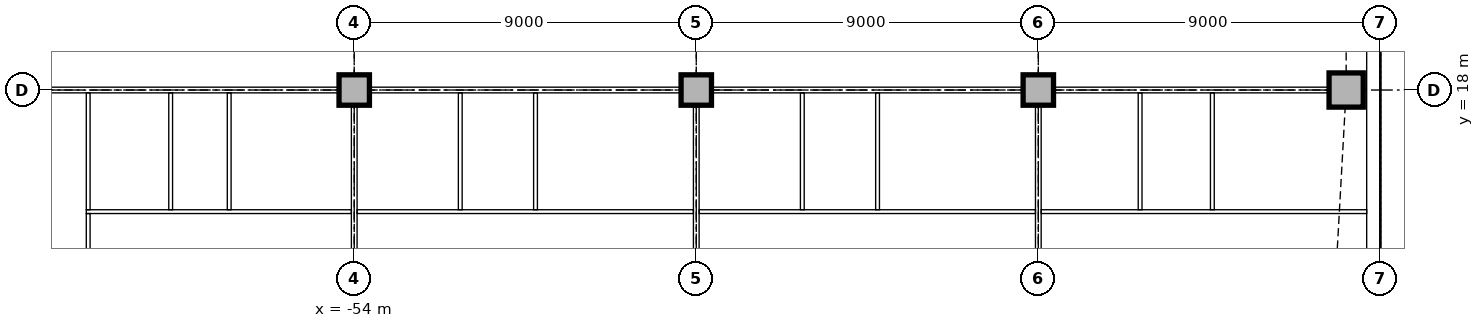
"""IFC4 building model, lengths in metres.
Left out: names, types, materials, properties, quantities, classifications, styles, units other than length and angle.
Written with IfcOpenShell. Run it as: python <this file> out.ifc"""

import sys

from ifc_helpers import new_model, si_unit, direction, frame, frame_2d, origin, origin_2d, place, context, subcontext, project, spatial, rectangle, extrude, element, fill, save


model = new_model("IFC4")
c1 = context("Model", 3, precision=1e-05, world=origin(), true_north=direction((0.0, 1.0)))
c2 = subcontext(c1, "Body", "Model", "MODEL_VIEW")
j1 = project(units=[si_unit("LENGTHUNIT", "METRE"), si_unit("PLANEANGLEUNIT", "RADIAN")], contexts=[c1])
p1 = place(None, origin())
s1 = spatial("IfcSite", under=j1, at=p1, CompositionType="ELEMENT")
p2 = place(p1, origin())
s2 = spatial("IfcBuilding", under=s1, at=p2, CompositionType="ELEMENT")
p3 = place(p2, frame((0.0, 0.0, 26.0)))
s3 = spatial("IfcBuildingStorey", under=s2, at=p3, CompositionType="ELEMENT", Elevation=26.0)
p4 = place(p3, frame((-27.9, 18.0, 0.0), z_axis=(0.0, 0.0, 1.0), x_axis=(1.0, 0.0, 0.0)))
e1 = element("IfcColumn", 1, at=p4, inside=s3, PredefinedType="COLUMN", context=c2, shape_type="SweptSolid", body=[
    extrude(rectangle(XDim=0.9, YDim=0.9, at=origin_2d()), origin(), (0.0, 0.0, 1.0), 3.85),
])
for number, where, z_axis, x_axis in (
    (2, (-54.0, 18.0, 0.0), (0.0, 0.0, 1.0), (1.0, 0.0, 0.0)),
    (3, (-45.0, 18.0, 0.0), (0.0, 0.0, 1.0), (1.0, 0.0, 0.0)),
    (4, (-36.0, 18.0, 0.0), (0.0, 0.0, 1.0), (1.0, 0.0, 0.0)),
):
    element("IfcColumn", number, at=place(p3, frame(where, z_axis=z_axis, x_axis=x_axis)), inside=s3, PredefinedType="COLUMN", context=c2, shape_type="SweptSolid", body=[
        extrude(rectangle(XDim=0.8, YDim=0.8, at=origin_2d()), origin(), (0.0, 0.0, 1.0), 3.85),
    ])
p5 = place(p3, frame((-27.18, 8.743, 0.0), z_axis=(0.0, 0.0, 1.0), x_axis=(0.0, 1.0, 0.0)))
e5 = element("IfcWall", 5, at=p5, inside=s3, PredefinedType="STANDARD", context=c2, shape_type="SweptSolid", body=[
    extrude(rectangle(XDim=12.257, YDim=0.36, at=frame_2d((6.129, 0.0))), origin(), (0.0, 0.0, 1.0), 3.85),
])
p6 = place(p5, frame((2.607, 0.0, 0.9)))
e6 = element("IfcOpeningElement", 6, at=p6, cuts=e5, PredefinedType="OPENING", context=c2, shape_type="SweptSolid", body=[
    extrude(rectangle(XDim=3.3, YDim=1.6, at=frame_2d((1.65, 0.8))), frame((0.0, 0.19, 0.0), z_axis=(0.0, -1.0, 0.0), x_axis=(1.0, 0.0, 0.0)), (0.0, 0.0, 1.0), 0.38),
])
p7 = place(p5, frame((7.607, 0.0, 0.9)))
e7 = element("IfcOpeningElement", 7, at=p7, cuts=e5, PredefinedType="OPENING", context=c2, shape_type="SweptSolid", body=[
    extrude(rectangle(XDim=3.3, YDim=1.6, at=frame_2d((1.65, 0.8))), frame((0.0, 0.19, 0.0), z_axis=(0.0, -1.0, 0.0), x_axis=(1.0, 0.0, 0.0)), (0.0, 0.0, 1.0), 0.38),
])
p8 = place(p3, frame((-35.6, 18.0, 0.0), z_axis=(0.0, 0.0, 1.0), x_axis=(1.0, 0.0, 0.0)))
e8 = element("IfcWall", 8, at=p8, inside=s3, PredefinedType="PARTITIONING", context=c2, shape_type="SweptSolid", body=[
    extrude(rectangle(XDim=7.25, YDim=0.15, at=frame_2d((3.625, 0.0))), origin(), (0.0, 0.0, 1.0), 3.15),
])
p9 = place(p8, frame((2.728, 0.0, 0.0)))
e9 = element("IfcOpeningElement", 9, at=p9, cuts=e8, PredefinedType="OPENING", context=c2, shape_type="SweptSolid", body=[
    extrude(rectangle(XDim=1.0, YDim=2.1, at=frame_2d((0.5, 1.05))), frame((0.0, 0.085, 0.0), z_axis=(0.0, -1.0, 0.0), x_axis=(1.0, 0.0, 0.0)), (0.0, 0.0, 1.0), 0.17),
])
p10 = place(p3, frame((-44.6, 18.0, 0.0), z_axis=(0.0, 0.0, 1.0), x_axis=(1.0, 0.0, 0.0)))
e10 = element("IfcWall", 10, at=p10, inside=s3, PredefinedType="PARTITIONING", context=c2, shape_type="SweptSolid", body=[
    extrude(rectangle(XDim=8.2, YDim=0.15, at=frame_2d((4.1, 0.0))), origin(), (0.0, 0.0, 1.0), 3.15),
])
p11 = place(p10, frame((3.0, 0.0, 0.0)))
e11 = element("IfcOpeningElement", 11, at=p11, cuts=e10, PredefinedType="OPENING", context=c2, shape_type="SweptSolid", body=[
    extrude(rectangle(XDim=1.0, YDim=2.1, at=frame_2d((0.5, 1.05))), frame((0.0, 0.085, 0.0), z_axis=(0.0, -1.0, 0.0), x_axis=(1.0, 0.0, 0.0)), (0.0, 0.0, 1.0), 0.17),
])
p12 = place(p3, frame((-53.6, 18.0, 0.0), z_axis=(0.0, 0.0, 1.0), x_axis=(1.0, 0.0, 0.0)))
e12 = element("IfcWall", 12, at=p12, inside=s3, PredefinedType="PARTITIONING", context=c2, shape_type="SweptSolid", body=[
    extrude(rectangle(XDim=8.2, YDim=0.15, at=frame_2d((4.1, 0.0))), origin(), (0.0, 0.0, 1.0), 3.15),
])
p13 = place(p12, frame((2.89, 0.0, 0.0)))
e13 = element("IfcOpeningElement", 13, at=p13, cuts=e12, PredefinedType="OPENING", context=c2, shape_type="SweptSolid", body=[
    extrude(rectangle(XDim=1.0, YDim=2.1, at=frame_2d((0.5, 1.05))), frame((0.0, 0.085, 0.0), z_axis=(0.0, -1.0, 0.0), x_axis=(1.0, 0.0, 0.0)), (0.0, 0.0, 1.0), 0.17),
])
p14 = place(p3, frame((-62.6, 18.0, 0.0), z_axis=(0.0, 0.0, 1.0), x_axis=(1.0, 0.0, 0.0)))
e14 = element("IfcWall", 14, at=p14, inside=s3, PredefinedType="PARTITIONING", context=c2, shape_type="SweptSolid", body=[
    extrude(rectangle(XDim=8.2, YDim=0.15, at=frame_2d((4.1, 0.0))), origin(), (0.0, 0.0, 1.0), 3.15),
])
p15 = place(p14, frame((0.4, 0.0, 0.0)))
e15 = element("IfcOpeningElement", 15, at=p15, cuts=e14, PredefinedType="OPENING", context=c2, shape_type="SweptSolid", body=[
    extrude(rectangle(XDim=0.9, YDim=2.1, at=frame_2d((0.45, 1.05))), frame((0.0, 0.085, 0.0), z_axis=(0.0, -1.0, 0.0), x_axis=(1.0, 0.0, 0.0)), (0.0, 0.0, 1.0), 0.17),
])
p16 = place(p14, frame((4.02, 0.0, 0.0)))
e16 = element("IfcOpeningElement", 16, at=p16, cuts=e14, PredefinedType="OPENING", context=c2, shape_type="SweptSolid", body=[
    extrude(rectangle(XDim=1.0, YDim=2.1, at=frame_2d((0.5, 1.05))), frame((0.0, 0.085, 0.0), z_axis=(0.0, -1.0, 0.0), x_axis=(1.0, 0.0, 0.0)), (0.0, 0.0, 1.0), 0.17),
])
for number, where, z_axis, x_axis in (
    (17, (-54.0, 9.4, 0.0), (0.0, 0.0, 1.0), (0.0, 1.0, 0.0)),
    (18, (-45.0, 9.4, 0.0), (0.0, 0.0, 1.0), (0.0, 1.0, 0.0)),
    (19, (-36.0, 9.4, 0.0), (0.0, 0.0, 1.0), (0.0, 1.0, 0.0)),
):
    element("IfcWall", number, at=place(p3, frame(where, z_axis=z_axis, x_axis=x_axis)), inside=s3, PredefinedType="PARTITIONING", context=c2, shape_type="SweptSolid", body=[
        extrude(rectangle(XDim=8.2, YDim=0.15, at=frame_2d((4.1, 0.0))), origin(), (0.0, 0.0, 1.0), 3.158),
    ])
p17 = place(p3, frame((-61.05, 14.8, 0.0), z_axis=(0.0, 0.0, 1.0), x_axis=(1.0, 0.0, 0.0)))
e20 = element("IfcWall", 20, at=p17, inside=s3, PredefinedType="PARTITIONING", context=c2, shape_type="SweptSolid", body=[
    extrude(rectangle(XDim=6.975, YDim=0.1, at=frame_2d((3.487, 0.0))), origin(), (0.0, 0.0, 1.0), 3.85),
])
p18 = place(p17, frame((2.52, 0.0, 0.0)))
e21 = element("IfcOpeningElement", 21, at=p18, cuts=e20, PredefinedType="OPENING", context=c2, shape_type="SweptSolid", body=[
    extrude(rectangle(XDim=0.9, YDim=2.1, at=frame_2d((0.45, 1.05))), frame((0.0, 0.06, 0.0), z_axis=(0.0, -1.0, 0.0), x_axis=(1.0, 0.0, 0.0)), (0.0, 0.0, 1.0), 0.12),
])
p19 = place(p3, frame((-53.925, 14.8, 0.0), z_axis=(0.0, 0.0, 1.0), x_axis=(1.0, 0.0, 0.0)))
e22 = element("IfcWall", 22, at=p19, inside=s3, PredefinedType="PARTITIONING", context=c2, shape_type="SweptSolid", body=[
    extrude(rectangle(XDim=8.85, YDim=0.1, at=frame_2d((4.425, 0.0))), origin(), (0.0, 0.0, 1.0), 3.85),
])
p20 = place(p19, frame((3.265, 0.0, 0.0)))
e23 = element("IfcOpeningElement", 23, at=p20, cuts=e22, PredefinedType="OPENING", context=c2, shape_type="SweptSolid", body=[
    extrude(rectangle(XDim=0.9, YDim=2.1, at=frame_2d((0.45, 1.05))), frame((0.0, 0.06, 0.0), z_axis=(0.0, -1.0, 0.0), x_axis=(1.0, 0.0, 0.0)), (0.0, 0.0, 1.0), 0.12),
])
p21 = place(p3, frame((-44.925, 14.8, 0.0), z_axis=(0.0, 0.0, 1.0), x_axis=(1.0, 0.0, 0.0)))
e24 = element("IfcWall", 24, at=p21, inside=s3, PredefinedType="PARTITIONING", context=c2, shape_type="SweptSolid", body=[
    extrude(rectangle(XDim=8.85, YDim=0.1, at=frame_2d((4.425, 0.0))), origin(), (0.0, 0.0, 1.0), 3.85),
])
p22 = place(p21, frame((3.265, 0.0, 0.0)))
e25 = element("IfcOpeningElement", 25, at=p22, cuts=e24, PredefinedType="OPENING", context=c2, shape_type="SweptSolid", body=[
    extrude(rectangle(XDim=0.9, YDim=2.1, at=frame_2d((0.45, 1.05))), frame((0.0, 0.06, 0.0), z_axis=(0.0, -1.0, 0.0), x_axis=(1.0, 0.0, 0.0)), (0.0, 0.0, 1.0), 0.12),
])
p23 = place(p3, frame((-35.925, 14.8, 0.0), z_axis=(0.0, 0.0, 1.0), x_axis=(1.0, 0.0, 0.0)))
e26 = element("IfcWall", 26, at=p23, inside=s3, PredefinedType="PARTITIONING", context=c2, shape_type="SweptSolid", body=[
    extrude(rectangle(XDim=8.565, YDim=0.1, at=frame_2d((4.282, 0.0))), origin(), (0.0, 0.0, 1.0), 3.85),
])
p24 = place(p23, frame((3.103, 0.0, 0.0)))
e27 = element("IfcOpeningElement", 27, at=p24, cuts=e26, PredefinedType="OPENING", context=c2, shape_type="SweptSolid", body=[
    extrude(rectangle(XDim=0.9, YDim=2.1, at=frame_2d((0.45, 1.05))), frame((0.0, 0.06, 0.0), z_axis=(0.0, -1.0, 0.0), x_axis=(1.0, 0.0, 0.0)), (0.0, 0.0, 1.0), 0.12),
])
p25 = place(p3, frame((-61.0, 14.85, 0.0), z_axis=(0.0, 0.0, 1.0), x_axis=(0.0, 1.0, 0.0)))
e28 = element("IfcWall", 28, at=p25, inside=s3, PredefinedType="PARTITIONING", context=c2, shape_type="SweptSolid", body=[
    extrude(rectangle(XDim=3.075, YDim=0.1, at=frame_2d((1.538, 0.0))), origin(), (0.0, 0.0, 1.0), 3.85),
])
p26 = place(p3, frame((-61.0, 4.86, 0.0), z_axis=(0.0, 0.0, 1.0), x_axis=(0.0, 1.0, 0.0)))
e29 = element("IfcWall", 29, at=p26, inside=s3, PredefinedType="PARTITIONING", context=c2, shape_type="SweptSolid", body=[
    extrude(rectangle(XDim=9.89, YDim=0.1, at=frame_2d((4.945, 0.0))), origin(), (0.0, 0.0, 1.0), 3.85),
])
p27 = place(p3, frame((-58.83, 14.85, 0.0), z_axis=(0.0, 0.0, 1.0), x_axis=(0.0, 1.0, 0.0)))
e30 = element("IfcWall", 30, at=p27, inside=s3, PredefinedType="PARTITIONING", context=c2, shape_type="SweptSolid", body=[
    extrude(rectangle(XDim=3.075, YDim=0.1, at=frame_2d((1.538, 0.0))), origin(), (0.0, 0.0, 1.0), 3.85),
])
p28 = place(p27, frame((1.1, 0.0, 0.0)))
e31 = element("IfcOpeningElement", 31, at=p28, cuts=e30, PredefinedType="OPENING", context=c2, shape_type="SweptSolid", body=[
    extrude(rectangle(XDim=0.9, YDim=2.1, at=frame_2d((0.45, 1.05))), frame((0.0, 0.06, 0.0), z_axis=(0.0, -1.0, 0.0), x_axis=(1.0, 0.0, 0.0)), (0.0, 0.0, 1.0), 0.12),
])
p29 = place(p3, frame((-57.29, 14.85, 0.0), z_axis=(0.0, 0.0, 1.0), x_axis=(0.0, 1.0, 0.0)))
e32 = element("IfcWall", 32, at=p29, inside=s3, PredefinedType="PARTITIONING", context=c2, shape_type="SweptSolid", body=[
    extrude(rectangle(XDim=3.075, YDim=0.1, at=frame_2d((1.538, 0.0))), origin(), (0.0, 0.0, 1.0), 3.85),
])
p30 = place(p29, frame((1.1, 0.0, 0.0)))
e33 = element("IfcOpeningElement", 33, at=p30, cuts=e32, PredefinedType="OPENING", context=c2, shape_type="SweptSolid", body=[
    extrude(rectangle(XDim=0.9, YDim=2.1, at=frame_2d((0.45, 1.05))), frame((0.0, 0.06, 0.0), z_axis=(0.0, -1.0, 0.0), x_axis=(1.0, 0.0, 0.0)), (0.0, 0.0, 1.0), 0.12),
])
p31 = place(p3, frame((-51.21, 14.85, 0.0), z_axis=(0.0, 0.0, 1.0), x_axis=(0.0, 1.0, 0.0)))
e34 = element("IfcWall", 34, at=p31, inside=s3, PredefinedType="PARTITIONING", context=c2, shape_type="SweptSolid", body=[
    extrude(rectangle(XDim=3.075, YDim=0.1, at=frame_2d((1.538, 0.0))), origin(), (0.0, 0.0, 1.0), 3.85),
])
p32 = place(p31, frame((1.1, 0.0, 0.0)))
e35 = element("IfcOpeningElement", 35, at=p32, cuts=e34, PredefinedType="OPENING", context=c2, shape_type="SweptSolid", body=[
    extrude(rectangle(XDim=0.9, YDim=2.1, at=frame_2d((0.45, 1.05))), frame((0.0, 0.06, 0.0), z_axis=(0.0, -1.0, 0.0), x_axis=(1.0, 0.0, 0.0)), (0.0, 0.0, 1.0), 0.12),
])
p33 = place(p3, frame((-49.23, 14.85, 0.0), z_axis=(0.0, 0.0, 1.0), x_axis=(0.0, 1.0, 0.0)))
e36 = element("IfcWall", 36, at=p33, inside=s3, PredefinedType="PARTITIONING", context=c2, shape_type="SweptSolid", body=[
    extrude(rectangle(XDim=3.075, YDim=0.1, at=frame_2d((1.538, 0.0))), origin(), (0.0, 0.0, 1.0), 3.85),
])
p34 = place(p33, frame((1.1, 0.0, 0.0)))
e37 = element("IfcOpeningElement", 37, at=p34, cuts=e36, PredefinedType="OPENING", context=c2, shape_type="SweptSolid", body=[
    extrude(rectangle(XDim=0.9, YDim=2.1, at=frame_2d((0.45, 1.05))), frame((0.0, 0.06, 0.0), z_axis=(0.0, -1.0, 0.0), x_axis=(1.0, 0.0, 0.0)), (0.0, 0.0, 1.0), 0.12),
])
p35 = place(p3, frame((-42.21, 14.85, 0.0), z_axis=(0.0, 0.0, 1.0), x_axis=(0.0, 1.0, 0.0)))
e38 = element("IfcWall", 38, at=p35, inside=s3, PredefinedType="PARTITIONING", context=c2, shape_type="SweptSolid", body=[
    extrude(rectangle(XDim=3.075, YDim=0.1, at=frame_2d((1.538, 0.0))), origin(), (0.0, 0.0, 1.0), 3.85),
])
p36 = place(p35, frame((1.1, 0.0, 0.0)))
e39 = element("IfcOpeningElement", 39, at=p36, cuts=e38, PredefinedType="OPENING", context=c2, shape_type="SweptSolid", body=[
    extrude(rectangle(XDim=0.9, YDim=2.1, at=frame_2d((0.45, 1.05))), frame((0.0, 0.06, 0.0), z_axis=(0.0, -1.0, 0.0), x_axis=(1.0, 0.0, 0.0)), (0.0, 0.0, 1.0), 0.12),
])
p37 = place(p3, frame((-40.23, 14.85, 0.0), z_axis=(0.0, 0.0, 1.0), x_axis=(0.0, 1.0, 0.0)))
e40 = element("IfcWall", 40, at=p37, inside=s3, PredefinedType="PARTITIONING", context=c2, shape_type="SweptSolid", body=[
    extrude(rectangle(XDim=3.075, YDim=0.1, at=frame_2d((1.538, 0.0))), origin(), (0.0, 0.0, 1.0), 3.85),
])
p38 = place(p37, frame((1.1, 0.0, 0.0)))
e41 = element("IfcOpeningElement", 41, at=p38, cuts=e40, PredefinedType="OPENING", context=c2, shape_type="SweptSolid", body=[
    extrude(rectangle(XDim=0.9, YDim=2.1, at=frame_2d((0.45, 1.05))), frame((0.0, 0.06, 0.0), z_axis=(0.0, -1.0, 0.0), x_axis=(1.0, 0.0, 0.0)), (0.0, 0.0, 1.0), 0.12),
])
p39 = place(p3, frame((-33.322, 14.85, 0.0), z_axis=(0.0, 0.0, 1.0), x_axis=(0.0, 1.0, 0.0)))
e42 = element("IfcWall", 42, at=p39, inside=s3, PredefinedType="PARTITIONING", context=c2, shape_type="SweptSolid", body=[
    extrude(rectangle(XDim=3.075, YDim=0.1, at=frame_2d((1.538, 0.0))), origin(), (0.0, 0.0, 1.0), 3.85),
])
p40 = place(p39, frame((1.1, 0.0, 0.0)))
e43 = element("IfcOpeningElement", 43, at=p40, cuts=e42, PredefinedType="OPENING", context=c2, shape_type="SweptSolid", body=[
    extrude(rectangle(XDim=0.9, YDim=2.1, at=frame_2d((0.45, 1.05))), frame((0.0, 0.06, 0.0), z_axis=(0.0, -1.0, 0.0), x_axis=(1.0, 0.0, 0.0)), (0.0, 0.0, 1.0), 0.12),
])
p41 = place(p3, frame((-31.421, 14.85, 0.0), z_axis=(0.0, 0.0, 1.0), x_axis=(0.0, 1.0, 0.0)))
e44 = element("IfcWall", 44, at=p41, inside=s3, PredefinedType="PARTITIONING", context=c2, shape_type="SweptSolid", body=[
    extrude(rectangle(XDim=3.075, YDim=0.1, at=frame_2d((1.538, 0.0))), origin(), (0.0, 0.0, 1.0), 3.85),
])
p42 = place(p41, frame((1.1, 0.0, 0.0)))
e45 = element("IfcOpeningElement", 45, at=p42, cuts=e44, PredefinedType="OPENING", context=c2, shape_type="SweptSolid", body=[
    extrude(rectangle(XDim=0.9, YDim=2.1, at=frame_2d((0.45, 1.05))), frame((0.0, 0.06, 0.0), z_axis=(0.0, -1.0, 0.0), x_axis=(1.0, 0.0, 0.0)), (0.0, 0.0, 1.0), 0.12),
])
p43 = place(p6, origin())
e46 = element("IfcWindow", 46, at=p43, inside=s3, PartitioningType="SINGLE_PANEL", PredefinedType="WINDOW", context=c2, shape_type="SweptSolid", body=[
    extrude(rectangle(XDim=3.3, YDim=1.6, at=frame_2d((1.65, 0.8))), frame((0.0, 0.13, 0.0), z_axis=(0.0, -1.0, 0.0), x_axis=(1.0, 0.0, 0.0)), (0.0, 0.0, 1.0), 0.06),
])
fill(e6, e46)
p44 = place(p7, origin())
e47 = element("IfcWindow", 47, at=p44, inside=s3, PartitioningType="SINGLE_PANEL", PredefinedType="WINDOW", context=c2, shape_type="SweptSolid", body=[
    extrude(rectangle(XDim=3.3, YDim=1.6, at=frame_2d((1.65, 0.8))), frame((0.0, 0.13, 0.0), z_axis=(0.0, -1.0, 0.0), x_axis=(1.0, 0.0, 0.0)), (0.0, 0.0, 1.0), 0.06),
])
fill(e7, e47)
p45 = place(p15, frame((0.9, 0.0, 0.0), z_axis=(0.0, 0.0, 1.0), x_axis=(-1.0, 0.0, 0.0)))
e48 = element("IfcDoor", 48, at=p45, inside=s3, OperationType="SINGLE_SWING_LEFT", PredefinedType="DOOR", context=c2, shape_type="SweptSolid", body=[
    extrude(rectangle(XDim=0.9, YDim=2.1, at=frame_2d((0.45, 1.05))), frame((0.0, 0.025, 0.0), z_axis=(0.0, -1.0, 0.0), x_axis=(1.0, 0.0, 0.0)), (0.0, 0.0, 1.0), 0.05),
])
fill(e15, e48)
p46 = place(p28, origin())
e49 = element("IfcDoor", 49, at=p46, inside=s3, OperationType="SINGLE_SWING_RIGHT", PredefinedType="DOOR", context=c2, shape_type="SweptSolid", body=[
    extrude(rectangle(XDim=0.9, YDim=2.1, at=frame_2d((0.45, 1.05))), frame((0.0, 0.025, 0.0), z_axis=(0.0, -1.0, 0.0), x_axis=(1.0, 0.0, 0.0)), (0.0, 0.0, 1.0), 0.05),
])
fill(e31, e49)
p47 = place(p30, origin())
e50 = element("IfcDoor", 50, at=p47, inside=s3, OperationType="SINGLE_SWING_RIGHT", PredefinedType="DOOR", context=c2, shape_type="SweptSolid", body=[
    extrude(rectangle(XDim=0.9, YDim=2.1, at=frame_2d((0.45, 1.05))), frame((0.0, 0.025, 0.0), z_axis=(0.0, -1.0, 0.0), x_axis=(1.0, 0.0, 0.0)), (0.0, 0.0, 1.0), 0.05),
])
fill(e33, e50)
p48 = place(p18, origin())
e51 = element("IfcDoor", 51, at=p48, inside=s3, OperationType="SINGLE_SWING_LEFT", PredefinedType="DOOR", context=c2, shape_type="SweptSolid", body=[
    extrude(rectangle(XDim=0.9, YDim=2.1, at=frame_2d((0.45, 1.05))), frame((0.0, 0.025, 0.0), z_axis=(0.0, -1.0, 0.0), x_axis=(1.0, 0.0, 0.0)), (0.0, 0.0, 1.0), 0.05),
])
fill(e21, e51)
p49 = place(p16, frame((1.0, 0.0, 0.0), z_axis=(0.0, 0.0, 1.0), x_axis=(-1.0, 0.0, 0.0)))
e52 = element("IfcDoor", 52, at=p49, inside=s3, OperationType="SINGLE_SWING_RIGHT", PredefinedType="DOOR", context=c2, shape_type="SweptSolid", body=[
    extrude(rectangle(XDim=1.0, YDim=2.1, at=frame_2d((0.5, 1.05))), frame((0.0, 0.025, 0.0), z_axis=(0.0, -1.0, 0.0), x_axis=(1.0, 0.0, 0.0)), (0.0, 0.0, 1.0), 0.05),
])
fill(e16, e52)
p50 = place(p32, origin())
e53 = element("IfcDoor", 53, at=p50, inside=s3, OperationType="SINGLE_SWING_RIGHT", PredefinedType="DOOR", context=c2, shape_type="SweptSolid", body=[
    extrude(rectangle(XDim=0.9, YDim=2.1, at=frame_2d((0.45, 1.05))), frame((0.0, 0.025, 0.0), z_axis=(0.0, -1.0, 0.0), x_axis=(1.0, 0.0, 0.0)), (0.0, 0.0, 1.0), 0.05),
])
fill(e35, e53)
p51 = place(p34, origin())
e54 = element("IfcDoor", 54, at=p51, inside=s3, OperationType="SINGLE_SWING_RIGHT", PredefinedType="DOOR", context=c2, shape_type="SweptSolid", body=[
    extrude(rectangle(XDim=0.9, YDim=2.1, at=frame_2d((0.45, 1.05))), frame((0.0, 0.025, 0.0), z_axis=(0.0, -1.0, 0.0), x_axis=(1.0, 0.0, 0.0)), (0.0, 0.0, 1.0), 0.05),
])
fill(e37, e54)
p52 = place(p20, origin())
e55 = element("IfcDoor", 55, at=p52, inside=s3, OperationType="SINGLE_SWING_RIGHT", PredefinedType="DOOR", context=c2, shape_type="SweptSolid", body=[
    extrude(rectangle(XDim=0.9, YDim=2.1, at=frame_2d((0.45, 1.05))), frame((0.0, 0.025, 0.0), z_axis=(0.0, -1.0, 0.0), x_axis=(1.0, 0.0, 0.0)), (0.0, 0.0, 1.0), 0.05),
])
fill(e23, e55)
p53 = place(p13, frame((1.0, 0.0, 0.0), z_axis=(0.0, 0.0, 1.0), x_axis=(-1.0, 0.0, 0.0)))
e56 = element("IfcDoor", 56, at=p53, inside=s3, OperationType="SINGLE_SWING_RIGHT", PredefinedType="DOOR", context=c2, shape_type="SweptSolid", body=[
    extrude(rectangle(XDim=1.0, YDim=2.1, at=frame_2d((0.5, 1.05))), frame((0.0, 0.025, 0.0), z_axis=(0.0, -1.0, 0.0), x_axis=(1.0, 0.0, 0.0)), (0.0, 0.0, 1.0), 0.05),
])
fill(e13, e56)
p54 = place(p36, origin())
e57 = element("IfcDoor", 57, at=p54, inside=s3, OperationType="SINGLE_SWING_LEFT", PredefinedType="DOOR", context=c2, shape_type="SweptSolid", body=[
    extrude(rectangle(XDim=0.9, YDim=2.1, at=frame_2d((0.45, 1.05))), frame((0.0, 0.025, 0.0), z_axis=(0.0, -1.0, 0.0), x_axis=(1.0, 0.0, 0.0)), (0.0, 0.0, 1.0), 0.05),
])
fill(e39, e57)
p55 = place(p38, origin())
e58 = element("IfcDoor", 58, at=p55, inside=s3, OperationType="SINGLE_SWING_LEFT", PredefinedType="DOOR", context=c2, shape_type="SweptSolid", body=[
    extrude(rectangle(XDim=0.9, YDim=2.1, at=frame_2d((0.45, 1.05))), frame((0.0, 0.025, 0.0), z_axis=(0.0, -1.0, 0.0), x_axis=(1.0, 0.0, 0.0)), (0.0, 0.0, 1.0), 0.05),
])
fill(e41, e58)
p56 = place(p22, origin())
e59 = element("IfcDoor", 59, at=p56, inside=s3, OperationType="SINGLE_SWING_RIGHT", PredefinedType="DOOR", context=c2, shape_type="SweptSolid", body=[
    extrude(rectangle(XDim=0.9, YDim=2.1, at=frame_2d((0.45, 1.05))), frame((0.0, 0.025, 0.0), z_axis=(0.0, -1.0, 0.0), x_axis=(1.0, 0.0, 0.0)), (0.0, 0.0, 1.0), 0.05),
])
fill(e25, e59)
p57 = place(p11, frame((1.0, 0.0, 0.0), z_axis=(0.0, 0.0, 1.0), x_axis=(-1.0, 0.0, 0.0)))
e60 = element("IfcDoor", 60, at=p57, inside=s3, OperationType="SINGLE_SWING_LEFT", PredefinedType="DOOR", context=c2, shape_type="SweptSolid", body=[
    extrude(rectangle(XDim=1.0, YDim=2.1, at=frame_2d((0.5, 1.05))), frame((0.0, 0.025, 0.0), z_axis=(0.0, -1.0, 0.0), x_axis=(1.0, 0.0, 0.0)), (0.0, 0.0, 1.0), 0.05),
])
fill(e11, e60)
p58 = place(p40, origin())
e61 = element("IfcDoor", 61, at=p58, inside=s3, OperationType="SINGLE_SWING_LEFT", PredefinedType="DOOR", context=c2, shape_type="SweptSolid", body=[
    extrude(rectangle(XDim=0.9, YDim=2.1, at=frame_2d((0.45, 1.05))), frame((0.0, 0.025, 0.0), z_axis=(0.0, -1.0, 0.0), x_axis=(1.0, 0.0, 0.0)), (0.0, 0.0, 1.0), 0.05),
])
fill(e43, e61)
p59 = place(p42, origin())
e62 = element("IfcDoor", 62, at=p59, inside=s3, OperationType="SINGLE_SWING_LEFT", PredefinedType="DOOR", context=c2, shape_type="SweptSolid", body=[
    extrude(rectangle(XDim=0.9, YDim=2.1, at=frame_2d((0.45, 1.05))), frame((0.0, 0.025, 0.0), z_axis=(0.0, -1.0, 0.0), x_axis=(1.0, 0.0, 0.0)), (0.0, 0.0, 1.0), 0.05),
])
fill(e45, e62)
p60 = place(p24, origin())
e63 = element("IfcDoor", 63, at=p60, inside=s3, OperationType="SINGLE_SWING_RIGHT", PredefinedType="DOOR", context=c2, shape_type="SweptSolid", body=[
    extrude(rectangle(XDim=0.9, YDim=2.1, at=frame_2d((0.45, 1.05))), frame((0.0, 0.025, 0.0), z_axis=(0.0, -1.0, 0.0), x_axis=(1.0, 0.0, 0.0)), (0.0, 0.0, 1.0), 0.05),
])
fill(e27, e63)
p61 = place(p9, frame((1.0, 0.0, 0.0), z_axis=(0.0, 0.0, 1.0), x_axis=(-1.0, 0.0, 0.0)))
e64 = element("IfcDoor", 64, at=p61, inside=s3, OperationType="SINGLE_SWING_RIGHT", PredefinedType="DOOR", context=c2, shape_type="SweptSolid", body=[
    extrude(rectangle(XDim=1.0, YDim=2.1, at=frame_2d((0.5, 1.05))), frame((0.0, 0.025, 0.0), z_axis=(0.0, -1.0, 0.0), x_axis=(1.0, 0.0, 0.0)), (0.0, 0.0, 1.0), 0.05),
])
fill(e9, e64)
save(model, sys.argv[1])
